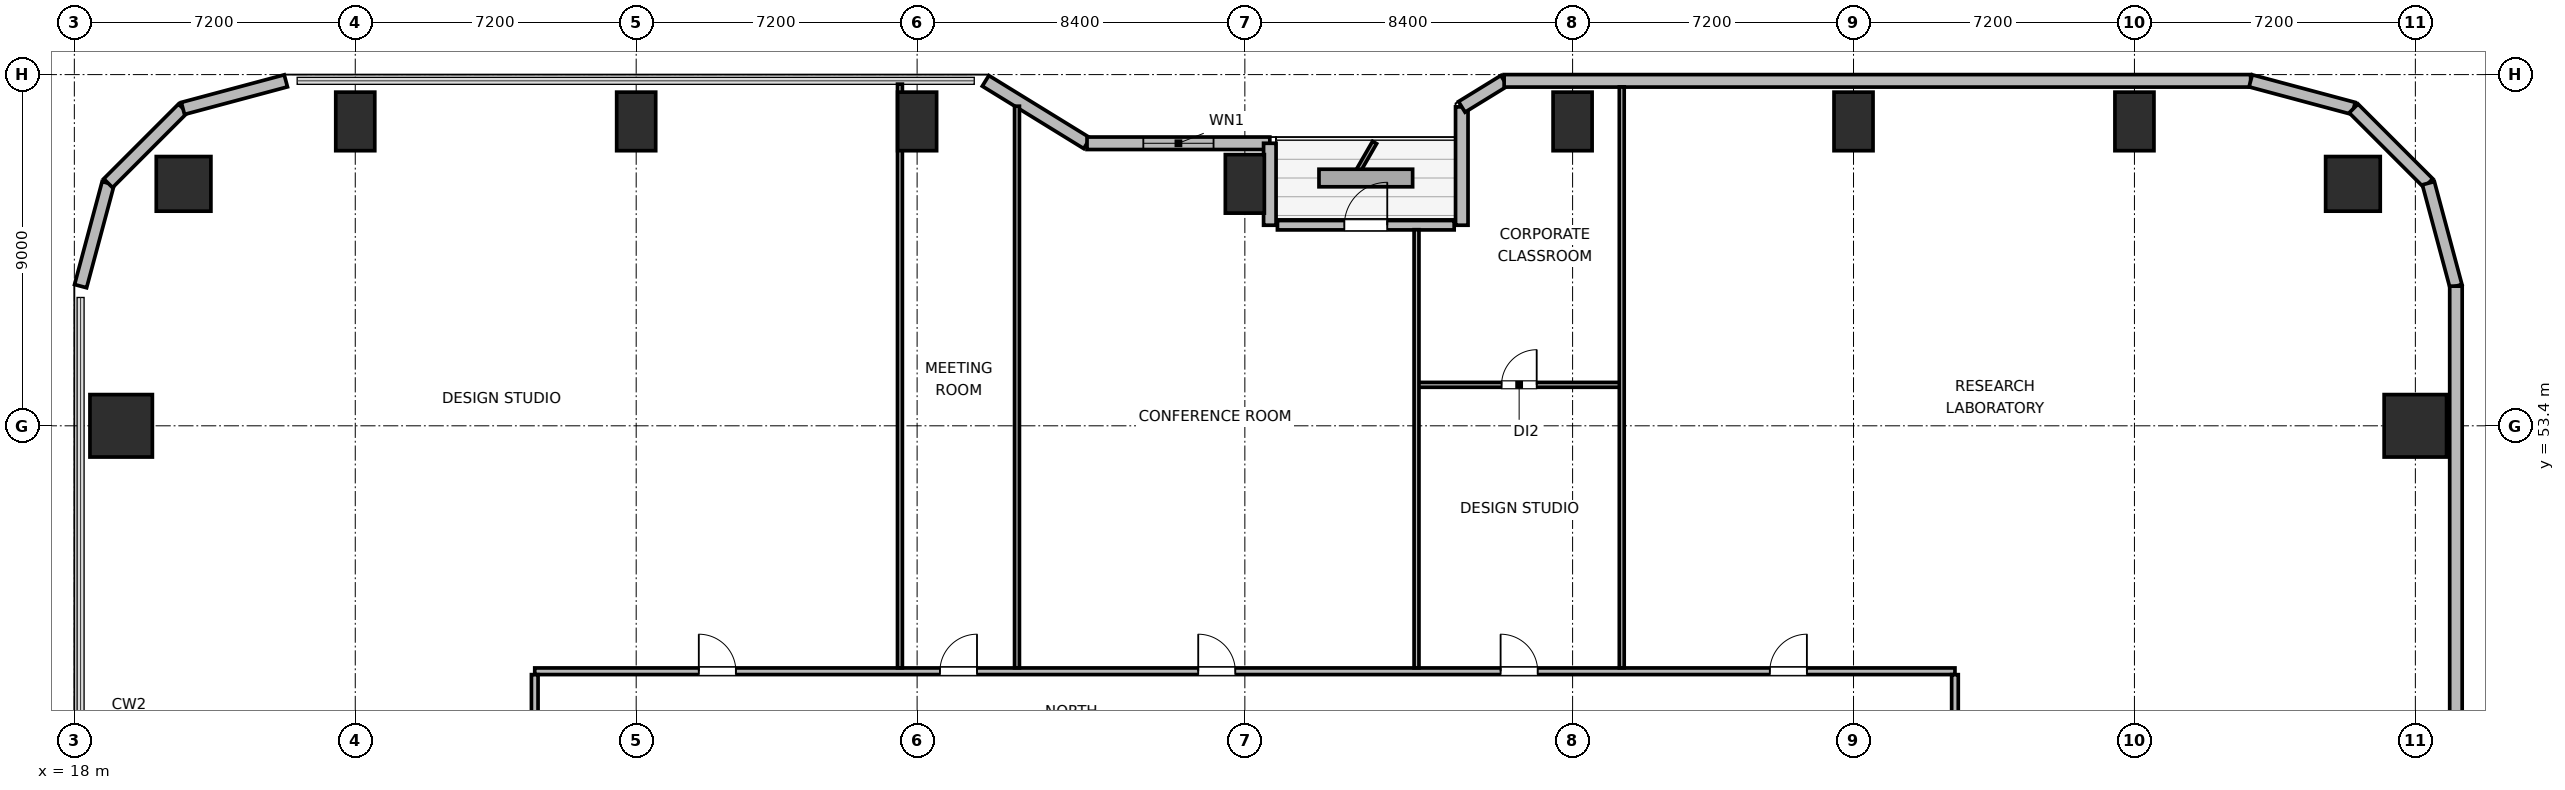
"""IFC4 building model, lengths in metres.
Left out: names, types, materials, properties, quantities, classifications, styles, units other than length and angle.
Written with IfcOpenShell. Run it as: python <this file> out.ifc"""

import sys

from ifc_helpers import new_model, si_unit, direction, frame, frame_2d, origin, origin_2d, place, context, subcontext, project, spatial, rectangle, circle, extrude, element, fill, save


model = new_model("IFC4")
c1 = context("Model", 3, precision=1e-05, world=origin(), true_north=direction((0.0, 1.0)))
c2 = subcontext(c1, "Body", "Model", "MODEL_VIEW")
j1 = project(units=[si_unit("LENGTHUNIT", "METRE"), si_unit("PLANEANGLEUNIT", "RADIAN")], contexts=[c1])
p1 = place(None, origin())
s1 = spatial("IfcSite", under=j1, at=p1, CompositionType="ELEMENT")
p2 = place(p1, origin())
s2 = spatial("IfcBuilding", under=s1, at=p2, CompositionType="ELEMENT")
p3 = place(p2, frame((0.0, 0.0, 48.9)))
s3 = spatial("IfcBuildingStorey", under=s2, at=p3, CompositionType="ELEMENT", Elevation=48.9)
for number, where, z_axis, x_axis in (
    (1, (76.4, 59.6, 0.0), (0.0, 0.0, 1.0), (1.0, 0.0, 0.0)),
    (2, (20.8, 59.6, 0.0), (0.0, 0.0, 1.0), (1.0, 0.0, 0.0)),
):
    element("IfcColumn", number, at=place(p3, frame(where, z_axis=z_axis, x_axis=x_axis)), inside=s3, PredefinedType="COLUMN", context=c2, shape_type="SweptSolid", body=[
        extrude(circle(Radius=0.7, at=origin_2d()), origin(), (0.0, 0.0, 1.0), 3.9),
    ])
for number, where, z_axis, x_axis in (
    (3, (25.2, 61.2, 0.0), (0.0, 0.0, 1.0), (1.0, 0.0, 0.0)),
    (4, (32.4, 61.2, 0.0), (0.0, 0.0, 1.0), (1.0, 0.0, 0.0)),
    (5, (39.6, 61.2, 0.0), (0.0, 0.0, 1.0), (1.0, 0.0, 0.0)),
    (6, (48.0, 59.6, 0.0), (0.0, 0.0, 1.0), (1.0, 0.0, 0.0)),
    (7, (56.4, 61.2, 0.0), (0.0, 0.0, 1.0), (1.0, 0.0, 0.0)),
    (8, (63.6, 61.2, 0.0), (0.0, 0.0, 1.0), (1.0, 0.0, 0.0)),
    (9, (70.8, 61.2, 0.0), (0.0, 0.0, 1.0), (1.0, 0.0, 0.0)),
):
    element("IfcColumn", number, at=place(p3, frame(where, z_axis=z_axis, x_axis=x_axis)), inside=s3, PredefinedType="COLUMN", context=c2, shape_type="SweptSolid", body=[
        extrude(rectangle(XDim=1.0, YDim=1.5, at=origin_2d()), origin(), (0.0, 0.0, 1.0), 3.9),
    ])
for number, where, z_axis, x_axis in (
    (10, (19.2, 53.4, 0.0), (0.0, 0.0, 1.0), (1.0, 0.0, 0.0)),
    (11, (78.0, 53.4, 0.0), (0.0, 0.0, 1.0), (1.0, 0.0, 0.0)),
):
    element("IfcColumn", number, at=place(p3, frame(where, z_axis=z_axis, x_axis=x_axis)), inside=s3, PredefinedType="COLUMN", context=c2, shape_type="SweptSolid", body=[
        extrude(rectangle(XDim=1.6, YDim=1.6, at=origin_2d()), origin(), (0.0, 0.0, 1.0), 3.9),
    ])
p4 = place(p3, frame((18.16, 56.979, 0.0), z_axis=(0.0, 0.0, 1.0), x_axis=(0.25869736047, 0.965958423373, 0.0)))
e12 = element("IfcWall", 12, at=p4, inside=s3, PredefinedType="SOLIDWALL", context=c2, shape_type="SweptSolid", body=[
    extrude(rectangle(XDim=2.731, YDim=0.32, at=frame_2d((1.366, 0.0))), origin(), (0.0, 0.0, 1.0), 3.64),
])
p5 = place(p3, frame((18.866, 59.617, 0.0), z_axis=(0.0, 0.0, 1.0), x_axis=(0.707106781187, 0.707106781187, 0.0)))
e13 = element("IfcWall", 13, at=p5, inside=s3, PredefinedType="SOLIDWALL", context=c2, shape_type="SweptSolid", body=[
    extrude(rectangle(XDim=2.71, YDim=0.32, at=frame_2d((1.355, 0.0))), origin(), (0.0, 0.0, 1.0), 3.64),
])
p6 = place(p3, frame((20.783, 61.533, 0.0), z_axis=(0.0, 0.0, 1.0), x_axis=(0.965964405026, 0.25867502435, 0.0)))
e14 = element("IfcWall", 14, at=p6, inside=s3, PredefinedType="SOLIDWALL", context=c2, shape_type="SweptSolid", body=[
    extrude(rectangle(XDim=2.731, YDim=0.32, at=frame_2d((1.366, 0.0))), origin(), (0.0, 0.0, 1.0), 3.64),
])
p7 = place(p3, frame((41.355, 62.24, 0.0), z_axis=(0.0, 0.0, 1.0), x_axis=(0.851630857047, -0.524142044989, 0.0)))
e15 = element("IfcWall", 15, at=p7, inside=s3, PredefinedType="SOLIDWALL", context=c2, shape_type="SweptSolid", body=[
    extrude(rectangle(XDim=3.053, YDim=0.32, at=frame_2d((1.526, 0.0))), origin(), (0.0, 0.0, 1.0), 2.875),
])
p8 = place(p3, frame((43.955, 60.64, 0.0), z_axis=(0.0, 0.0, 1.0), x_axis=(1.0, 0.0, 0.0)))
e16 = element("IfcWall", 16, at=p8, inside=s3, PredefinedType="SOLIDWALL", context=c2, shape_type="SweptSolid", body=[
    extrude(rectangle(XDim=4.685, YDim=0.32, at=frame_2d((2.343, 0.0))), origin(), (0.0, 0.0, 1.0), 2.875),
])
p9 = place(p8, frame((1.443, 0.0, 0.85)))
e17 = element("IfcOpeningElement", 17, at=p9, cuts=e16, PredefinedType="OPENING", context=c2, shape_type="SweptSolid", body=[
    extrude(rectangle(XDim=1.8, YDim=1.1, at=frame_2d((0.9, 0.55))), frame((0.0, 0.17, 0.0), z_axis=(0.0, -1.0, 0.0), x_axis=(1.0, 0.0, 0.0)), (0.0, 0.0, 1.0), 0.34),
])
p10 = place(p3, frame((48.64, 60.64, 0.0), z_axis=(0.0, 0.0, 1.0), x_axis=(0.0, -1.0, 0.0)))
e18 = element("IfcWall", 18, at=p10, inside=s3, PredefinedType="SOLIDWALL", context=c2, shape_type="SweptSolid", body=[
    extrude(rectangle(XDim=2.1, YDim=0.32, at=frame_2d((1.05, 0.0))), origin(), (0.0, 0.0, 1.0), 2.875),
])
p11 = place(p3, frame((48.835, 58.54, 0.0), z_axis=(0.0, 0.0, 1.0), x_axis=(1.0, 0.0, 0.0)))
e19 = element("IfcWall", 19, at=p11, inside=s3, PredefinedType="SOLIDWALL", context=c2, shape_type="SweptSolid", body=[
    extrude(rectangle(XDim=4.53, YDim=0.24, at=frame_2d((2.265, 0.0))), origin(), (0.0, 0.0, 1.0), 3.64),
])
p12 = place(p11, frame((1.715, 0.0, 0.0)))
e20 = element("IfcOpeningElement", 20, at=p12, cuts=e19, PredefinedType="OPENING", context=c2, shape_type="SweptSolid", body=[
    extrude(rectangle(XDim=1.1, YDim=2.04, at=frame_2d((0.55, 1.02))), frame((0.0, 0.13, 0.0), z_axis=(0.0, -1.0, 0.0), x_axis=(1.0, 0.0, 0.0)), (0.0, 0.0, 1.0), 0.26),
])
p13 = place(p3, frame((53.56, 58.54, 0.0), z_axis=(0.0, 0.0, 1.0), x_axis=(0.0, 1.0, 0.0)))
e21 = element("IfcWall", 21, at=p13, inside=s3, PredefinedType="SOLIDWALL", context=c2, shape_type="SweptSolid", body=[
    extrude(rectangle(XDim=3.032, YDim=0.32, at=frame_2d((1.516, 0.0))), origin(), (0.0, 0.0, 1.0), 2.875),
])
p14 = place(p3, frame((53.56, 61.573, 0.0), z_axis=(0.0, 0.0, 1.0), x_axis=(0.851776724646, 0.523904964045, 0.0)))
e22 = element("IfcWall", 22, at=p14, inside=s3, PredefinedType="SOLIDWALL", context=c2, shape_type="SweptSolid", body=[
    extrude(rectangle(XDim=1.274, YDim=0.32, at=frame_2d((0.637, 0.0))), origin(), (0.0, 0.0, 1.0), 3.64),
])
p15 = place(p3, frame((54.645, 62.24, 0.0), z_axis=(0.0, 0.0, 1.0), x_axis=(1.0, 0.0, 0.0)))
e23 = element("IfcWall", 23, at=p15, inside=s3, PredefinedType="SOLIDWALL", context=c2, shape_type="SweptSolid", body=[
    extrude(rectangle(XDim=19.134, YDim=0.32, at=frame_2d((9.567, 0.0))), origin(), (0.0, 0.0, 1.0), 3.64),
])
p16 = place(p3, frame((73.779, 62.24, 0.0), z_axis=(0.0, 0.0, 1.0), x_axis=(0.965964405026, -0.25867502435, 0.0)))
e24 = element("IfcWall", 24, at=p16, inside=s3, PredefinedType="SOLIDWALL", context=c2, shape_type="SweptSolid", body=[
    extrude(rectangle(XDim=2.731, YDim=0.32, at=frame_2d((1.366, 0.0))), origin(), (0.0, 0.0, 1.0), 3.64),
])
p17 = place(p3, frame((76.417, 61.533, 0.0), z_axis=(0.0, 0.0, 1.0), x_axis=(0.707106781187, -0.707106781187, 0.0)))
e25 = element("IfcWall", 25, at=p17, inside=s3, PredefinedType="SOLIDWALL", context=c2, shape_type="SweptSolid", body=[
    extrude(rectangle(XDim=2.71, YDim=0.32, at=frame_2d((1.355, 0.0))), origin(), (0.0, 0.0, 1.0), 3.64),
])
p18 = place(p3, frame((78.333, 59.617, 0.0), z_axis=(0.0, 0.0, 1.0), x_axis=(0.25869736047, -0.965958423373, 0.0)))
e26 = element("IfcWall", 26, at=p18, inside=s3, PredefinedType="SOLIDWALL", context=c2, shape_type="SweptSolid", body=[
    extrude(rectangle(XDim=2.731, YDim=0.32, at=frame_2d((1.366, 0.0))), origin(), (0.0, 0.0, 1.0), 3.64),
])
p19 = place(p3, frame((79.04, 56.979, 0.0), z_axis=(0.0, 0.0, 1.0), x_axis=(0.0, -1.0, 0.0)))
e27 = element("IfcWall", 27, at=p19, inside=s3, PredefinedType="SOLIDWALL", context=c2, shape_type="SweptSolid", body=[
    extrude(rectangle(XDim=14.219, YDim=0.32, at=frame_2d((7.109, 0.0))), origin(), (0.0, 0.0, 1.0), 3.64),
])
p20 = place(p3, frame((29.8, 47.11, 0.0), z_axis=(0.0, 0.0, 1.0), x_axis=(1.0, 0.0, 0.0)))
e28 = element("IfcWall", 28, at=p20, inside=s3, PredefinedType="PARTITIONING", context=c2, shape_type="SweptSolid", body=[
    extrude(rectangle(XDim=36.4, YDim=0.17, at=frame_2d((18.2, 0.0))), origin(), (0.0, 0.0, 1.0), 3.64),
])
p21 = place(p20, frame((4.205, 0.0, 0.0)))
e29 = element("IfcOpeningElement", 29, at=p21, cuts=e28, PredefinedType="OPENING", context=c2, shape_type="SweptSolid", body=[
    extrude(rectangle(XDim=0.95, YDim=2.04, at=frame_2d((0.475, 1.02))), frame((0.0, 0.095, 0.0), z_axis=(0.0, -1.0, 0.0), x_axis=(1.0, 0.0, 0.0)), (0.0, 0.0, 1.0), 0.19),
])
p22 = place(p20, frame((10.385, 0.0, 0.0)))
e30 = element("IfcOpeningElement", 30, at=p22, cuts=e28, PredefinedType="OPENING", context=c2, shape_type="SweptSolid", body=[
    extrude(rectangle(XDim=0.95, YDim=2.04, at=frame_2d((0.475, 1.02))), frame((0.0, 0.095, 0.0), z_axis=(0.0, -1.0, 0.0), x_axis=(1.0, 0.0, 0.0)), (0.0, 0.0, 1.0), 0.19),
])
p23 = place(p20, frame((17.005, 0.0, 0.0)))
e31 = element("IfcOpeningElement", 31, at=p23, cuts=e28, PredefinedType="OPENING", context=c2, shape_type="SweptSolid", body=[
    extrude(rectangle(XDim=0.95, YDim=2.04, at=frame_2d((0.475, 1.02))), frame((0.0, 0.095, 0.0), z_axis=(0.0, -1.0, 0.0), x_axis=(1.0, 0.0, 0.0)), (0.0, 0.0, 1.0), 0.19),
])
p24 = place(p20, frame((24.755, 0.0, 0.0)))
e32 = element("IfcOpeningElement", 32, at=p24, cuts=e28, PredefinedType="OPENING", context=c2, shape_type="SweptSolid", body=[
    extrude(rectangle(XDim=0.95, YDim=2.04, at=frame_2d((0.475, 1.02))), frame((0.0, 0.095, 0.0), z_axis=(0.0, -1.0, 0.0), x_axis=(1.0, 0.0, 0.0)), (0.0, 0.0, 1.0), 0.19),
])
p25 = place(p20, frame((31.655, 0.0, 0.0)))
e33 = element("IfcOpeningElement", 33, at=p25, cuts=e28, PredefinedType="OPENING", context=c2, shape_type="SweptSolid", body=[
    extrude(rectangle(XDim=0.95, YDim=2.04, at=frame_2d((0.475, 1.02))), frame((0.0, 0.095, 0.0), z_axis=(0.0, -1.0, 0.0), x_axis=(1.0, 0.0, 0.0)), (0.0, 0.0, 1.0), 0.19),
])
p26 = place(p3, frame((29.8, 24.977, 0.0), z_axis=(0.0, 0.0, 1.0), x_axis=(0.0, 1.0, 0.0)))
e34 = element("IfcWall", 34, at=p26, inside=s3, PredefinedType="PARTITIONING", context=c2, shape_type="SweptSolid", body=[
    extrude(rectangle(XDim=22.046, YDim=0.17, at=frame_2d((11.023, 0.0))), origin(), (0.0, 0.0, 1.0), 3.64),
])
p27 = place(p26, frame((10.548, 0.0, 0.0)))
e35 = element("IfcOpeningElement", 35, at=p27, cuts=e34, PredefinedType="OPENING", context=c2, shape_type="SweptSolid", body=[
    extrude(rectangle(XDim=0.95, YDim=2.04, at=frame_2d((0.475, 1.02))), frame((0.0, 0.095, 0.0), z_axis=(0.0, -1.0, 0.0), x_axis=(1.0, 0.0, 0.0)), (0.0, 0.0, 1.0), 0.19),
])
p28 = place(p3, frame((66.2, 24.977, 0.0), z_axis=(0.0, 0.0, 1.0), x_axis=(0.0, 1.0, 0.0)))
e36 = element("IfcWall", 36, at=p28, inside=s3, PredefinedType="PARTITIONING", context=c2, shape_type="SweptSolid", body=[
    extrude(rectangle(XDim=22.046, YDim=0.17, at=frame_2d((11.023, 0.0))), origin(), (0.0, 0.0, 1.0), 3.64),
])
p29 = place(p28, frame((4.493, 0.0, 0.0)))
e37 = element("IfcOpeningElement", 37, at=p29, cuts=e36, PredefinedType="OPENING", context=c2, shape_type="SweptSolid", body=[
    extrude(rectangle(XDim=0.95, YDim=2.04, at=frame_2d((0.475, 1.02))), frame((0.0, 0.095, 0.0), z_axis=(0.0, -1.0, 0.0), x_axis=(1.0, 0.0, 0.0)), (0.0, 0.0, 1.0), 0.19),
])
p30 = place(p28, frame((15.603, 0.0, 0.0)))
e38 = element("IfcOpeningElement", 38, at=p30, cuts=e36, PredefinedType="OPENING", context=c2, shape_type="SweptSolid", body=[
    extrude(rectangle(XDim=0.95, YDim=2.04, at=frame_2d((0.475, 1.02))), frame((0.0, 0.095, 0.0), z_axis=(0.0, -1.0, 0.0), x_axis=(1.0, 0.0, 0.0)), (0.0, 0.0, 1.0), 0.19),
])
p31 = place(p3, frame((39.16, 47.197, 0.0), z_axis=(0.0, 0.0, 1.0), x_axis=(0.0, 1.0, 0.0)))
e39 = element("IfcWall", 39, at=p31, inside=s3, PredefinedType="PARTITIONING", context=c2, shape_type="SweptSolid", body=[
    extrude(rectangle(XDim=14.958, YDim=0.125, at=frame_2d((7.479, 0.0))), origin(), (0.0, 0.0, 1.0), 3.64),
])
p32 = place(p3, frame((42.16, 47.197, 0.0), z_axis=(0.0, 0.0, 1.0), x_axis=(0.0, 1.0, 0.0)))
e40 = element("IfcWall", 40, at=p32, inside=s3, PredefinedType="PARTITIONING", context=c2, shape_type="SweptSolid", body=[
    extrude(rectangle(XDim=14.393, YDim=0.125, at=frame_2d((7.197, 0.0))), origin(), (0.0, 0.0, 1.0), 3.003),
])
p33 = place(p3, frame((52.4, 54.45, 0.0), z_axis=(0.0, 0.0, 1.0), x_axis=(1.0, 0.0, 0.0)))
e41 = element("IfcWall", 41, at=p33, inside=s3, PredefinedType="PARTITIONING", context=c2, shape_type="SweptSolid", body=[
    extrude(rectangle(XDim=5.26, YDim=0.125, at=frame_2d((2.63, 0.0))), origin(), (0.0, 0.0, 1.0), 3.64),
])
p34 = place(p33, frame((2.18, 0.0, 0.0)))
e42 = element("IfcOpeningElement", 42, at=p34, cuts=e41, PredefinedType="OPENING", context=c2, shape_type="SweptSolid", body=[
    extrude(rectangle(XDim=0.9, YDim=2.02, at=frame_2d((0.45, 1.01))), frame((0.0, 0.073, 0.0), z_axis=(0.0, -1.0, 0.0), x_axis=(1.0, 0.0, 0.0)), (0.0, 0.0, 1.0), 0.145),
])
p35 = place(p3, frame((52.4, 47.197, 0.0), z_axis=(0.0, 0.0, 1.0), x_axis=(0.0, 1.0, 0.0)))
e43 = element("IfcWall", 43, at=p35, inside=s3, PredefinedType="PARTITIONING", context=c2, shape_type="SweptSolid", body=[
    extrude(rectangle(XDim=11.228, YDim=0.125, at=frame_2d((5.614, 0.0))), origin(), (0.0, 0.0, 1.0), 3.003),
])
p36 = place(p3, frame((57.66, 47.197, 0.0), z_axis=(0.0, 0.0, 1.0), x_axis=(0.0, 1.0, 0.0)))
e44 = element("IfcWall", 44, at=p36, inside=s3, PredefinedType="PARTITIONING", context=c2, shape_type="SweptSolid", body=[
    extrude(rectangle(XDim=14.888, YDim=0.125, at=frame_2d((7.444, 0.0))), origin(), (0.0, 0.0, 1.0), 3.64),
])
p37 = place(p9, origin())
e45 = element("IfcWindow", 45, at=p37, inside=s3, PartitioningType="SINGLE_PANEL", PredefinedType="WINDOW", context=c2, shape_type="SweptSolid", body=[
    extrude(rectangle(XDim=1.8, YDim=1.1, at=frame_2d((0.9, 0.55))), frame((0.0, 0.03, 0.0), z_axis=(0.0, -1.0, 0.0), x_axis=(1.0, 0.0, 0.0)), (0.0, 0.0, 1.0), 0.06),
])
fill(e17, e45)
p38 = place(p12, origin())
e46 = element("IfcDoor", 46, at=p38, inside=s3, OperationType="SINGLE_SWING_RIGHT", PredefinedType="DOOR", context=c2, shape_type="SweptSolid", body=[
    extrude(rectangle(XDim=1.1, YDim=2.04, at=frame_2d((0.55, 1.02))), frame((0.0, 0.025, 0.0), z_axis=(0.0, -1.0, 0.0), x_axis=(1.0, 0.0, 0.0)), (0.0, 0.0, 1.0), 0.05),
])
fill(e20, e46)
p39 = place(p21, origin())
e47 = element("IfcDoor", 47, at=p39, inside=s3, OperationType="SINGLE_SWING_LEFT", PredefinedType="DOOR", context=c2, shape_type="SweptSolid", body=[
    extrude(rectangle(XDim=0.95, YDim=2.04, at=frame_2d((0.475, 1.02))), frame((0.0, 0.025, 0.0), z_axis=(0.0, -1.0, 0.0), x_axis=(1.0, 0.0, 0.0)), (0.0, 0.0, 1.0), 0.05),
])
fill(e29, e47)
p40 = place(p22, origin())
e48 = element("IfcDoor", 48, at=p40, inside=s3, OperationType="SINGLE_SWING_RIGHT", PredefinedType="DOOR", context=c2, shape_type="SweptSolid", body=[
    extrude(rectangle(XDim=0.95, YDim=2.04, at=frame_2d((0.475, 1.02))), frame((0.0, 0.025, 0.0), z_axis=(0.0, -1.0, 0.0), x_axis=(1.0, 0.0, 0.0)), (0.0, 0.0, 1.0), 0.05),
])
fill(e30, e48)
p41 = place(p23, origin())
e49 = element("IfcDoor", 49, at=p41, inside=s3, OperationType="SINGLE_SWING_LEFT", PredefinedType="DOOR", context=c2, shape_type="SweptSolid", body=[
    extrude(rectangle(XDim=0.95, YDim=2.04, at=frame_2d((0.475, 1.02))), frame((0.0, 0.025, 0.0), z_axis=(0.0, -1.0, 0.0), x_axis=(1.0, 0.0, 0.0)), (0.0, 0.0, 1.0), 0.05),
])
fill(e31, e49)
p42 = place(p34, origin())
e50 = element("IfcDoor", 50, at=p42, inside=s3, OperationType="SINGLE_SWING_RIGHT", PredefinedType="DOOR", context=c2, shape_type="SweptSolid", body=[
    extrude(rectangle(XDim=0.9, YDim=2.02, at=frame_2d((0.45, 1.01))), frame((0.0, 0.025, 0.0), z_axis=(0.0, -1.0, 0.0), x_axis=(1.0, 0.0, 0.0)), (0.0, 0.0, 1.0), 0.05),
])
fill(e42, e50)
p43 = place(p24, origin())
e51 = element("IfcDoor", 51, at=p43, inside=s3, OperationType="SINGLE_SWING_LEFT", PredefinedType="DOOR", context=c2, shape_type="SweptSolid", body=[
    extrude(rectangle(XDim=0.95, YDim=2.04, at=frame_2d((0.475, 1.02))), frame((0.0, 0.025, 0.0), z_axis=(0.0, -1.0, 0.0), x_axis=(1.0, 0.0, 0.0)), (0.0, 0.0, 1.0), 0.05),
])
fill(e32, e51)
p44 = place(p25, origin())
e52 = element("IfcDoor", 52, at=p44, inside=s3, OperationType="SINGLE_SWING_RIGHT", PredefinedType="DOOR", context=c2, shape_type="SweptSolid", body=[
    extrude(rectangle(XDim=0.95, YDim=2.04, at=frame_2d((0.475, 1.02))), frame((0.0, 0.025, 0.0), z_axis=(0.0, -1.0, 0.0), x_axis=(1.0, 0.0, 0.0)), (0.0, 0.0, 1.0), 0.05),
])
fill(e33, e52)
save(model, sys.argv[1])
